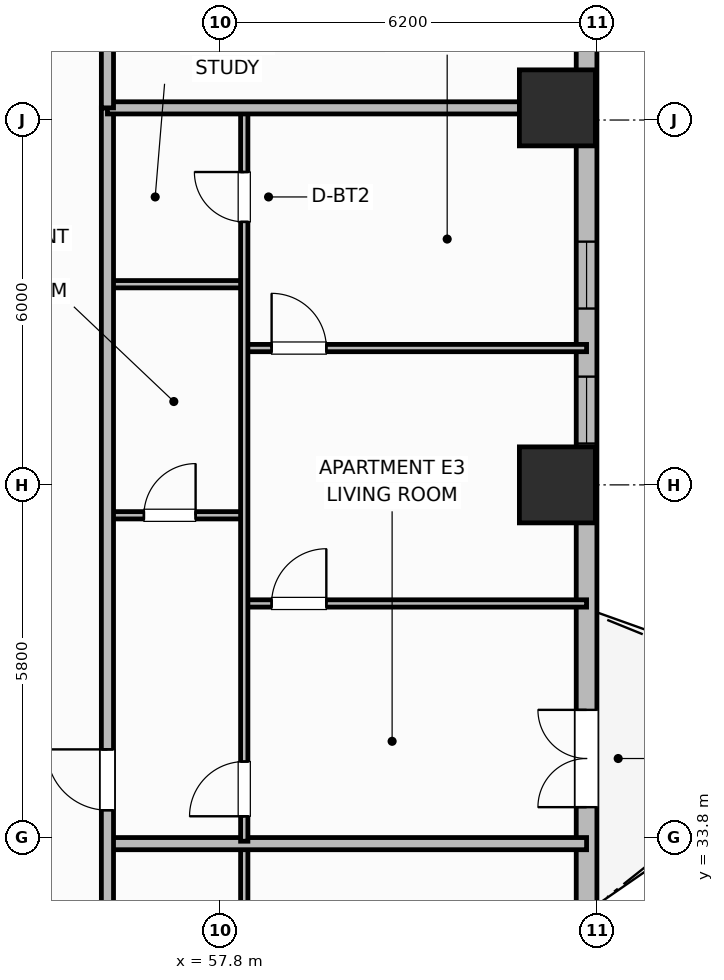
"""IFC4 building model, lengths in metres.
Left out: names, types, materials, properties, quantities, classifications, styles, units other than length and angle.
Written with IfcOpenShell. Run it as: python <this file> out.ifc"""

import sys

from ifc_helpers import new_model, si_unit, direction, frame, frame_2d, origin, origin_2d, place, context, subcontext, project, spatial, rectangle, extrude, element, fill, save


model = new_model("IFC4")
c1 = context("Model", 3, precision=1e-05, world=origin(), true_north=direction((0.0, 1.0)))
c2 = subcontext(c1, "Body", "Model", "MODEL_VIEW")
j1 = project(units=[si_unit("LENGTHUNIT", "METRE"), si_unit("PLANEANGLEUNIT", "RADIAN")], contexts=[c1])
p1 = place(None, origin())
s1 = spatial("IfcSite", under=j1, at=p1, CompositionType="ELEMENT")
p2 = place(p1, origin())
s2 = spatial("IfcBuilding", under=s1, at=p2, CompositionType="ELEMENT")
p3 = place(p2, frame((0.0, 0.0, 28.8)))
s3 = spatial("IfcBuildingStorey", under=s2, at=p3, CompositionType="ELEMENT", Elevation=28.8)
for number, where, z_axis, x_axis in (
    (1, (63.35, 39.6, 0.0), (0.0, 0.0, 1.0), (1.0, 0.0, 0.0)),
    (2, (63.35, 45.8, 0.0), (0.0, 0.0, 1.0), (1.0, 0.0, 0.0)),
):
    element("IfcColumn", number, at=place(p3, frame(where, z_axis=z_axis, x_axis=x_axis)), inside=s3, PredefinedType="COLUMN", context=c2, shape_type="SweptSolid", body=[
        extrude(rectangle(XDim=1.25, YDim=1.25, at=origin_2d()), origin(), (0.0, 0.0, 1.0), 3.7),
    ])
p4 = place(p3, frame((63.83, 32.6, 0.0), z_axis=(0.0, 0.0, 1.0), x_axis=(0.0, 1.0, 0.0)))
e3 = element("IfcWall", 3, at=p4, inside=s3, PredefinedType="SOLIDWALL", context=c2, shape_type="SweptSolid", body=[
    extrude(rectangle(XDim=14.8, YDim=0.34, at=frame_2d((7.4, 0.0))), origin(), (0.0, 0.0, 1.0), 2.7),
])
p5 = place(p4, frame((1.7, 0.0, 0.0)))
e4 = element("IfcOpeningElement", 4, at=p5, cuts=e3, PredefinedType="OPENING", context=c2, shape_type="SweptSolid", body=[
    extrude(rectangle(XDim=1.6, YDim=2.1, at=frame_2d((0.8, 1.05))), frame((0.0, 0.18, 0.0), z_axis=(0.0, -1.0, 0.0), x_axis=(1.0, 0.0, 0.0)), (0.0, 0.0, 1.0), 0.36),
])
p6 = place(p4, frame((7.68, 0.0, 0.89)))
e5 = element("IfcOpeningElement", 5, at=p6, cuts=e3, PredefinedType="OPENING", context=c2, shape_type="SweptSolid", body=[
    extrude(rectangle(XDim=1.1, YDim=1.65, at=frame_2d((0.55, 0.825))), frame((0.0, 0.18, 0.0), z_axis=(0.0, -1.0, 0.0), x_axis=(1.0, 0.0, 0.0)), (0.0, 0.0, 1.0), 0.36),
])
p7 = place(p4, frame((9.9, 0.0, 0.93)))
e6 = element("IfcOpeningElement", 6, at=p7, cuts=e3, PredefinedType="OPENING", context=c2, shape_type="SweptSolid", body=[
    extrude(rectangle(XDim=1.1, YDim=1.65, at=frame_2d((0.55, 0.825))), frame((0.0, 0.18, 0.0), z_axis=(0.0, -1.0, 0.0), x_axis=(1.0, 0.0, 0.0)), (0.0, 0.0, 1.0), 0.36),
])
p8 = place(p3, frame((58.2, 22.608, 0.0), z_axis=(0.0, 0.0, 1.0), x_axis=(0.0, 1.0, 0.0)))
e7 = element("IfcWall", 7, at=p8, inside=s3, PredefinedType="PARTITIONING", context=c2, shape_type="SweptSolid", body=[
    extrude(rectangle(XDim=11.052, YDim=0.12, at=frame_2d((5.526, 0.0))), origin(), (0.0, 0.0, 1.0), 2.53),
])
p9 = place(p8, frame((0.41, 0.0, 0.0)))
e8 = element("IfcOpeningElement", 8, at=p9, cuts=e7, PredefinedType="OPENING", context=c2, shape_type="SweptSolid", body=[
    extrude(rectangle(XDim=0.9, YDim=2.1, at=frame_2d((0.45, 1.05))), frame((0.0, 0.07, 0.0), z_axis=(0.0, -1.0, 0.0), x_axis=(1.0, 0.0, 0.0)), (0.0, 0.0, 1.0), 0.14),
])
p10 = place(p3, frame((55.95, 33.7, 0.0), z_axis=(0.0, 0.0, 1.0), x_axis=(1.0, 0.0, 0.0)))
e9 = element("IfcWall", 9, at=p10, inside=s3, PredefinedType="PARTITIONING", context=c2, shape_type="SweptSolid", body=[
    extrude(rectangle(XDim=7.88, YDim=0.2, at=frame_2d((3.94, 0.0))), origin(), (0.0, 0.0, 1.0), 2.53),
])
p11 = place(p3, frame((55.95, 39.1, 0.0), z_axis=(0.0, 0.0, 1.0), x_axis=(1.0, 0.0, 0.0)))
e10 = element("IfcWall", 10, at=p11, inside=s3, PredefinedType="PARTITIONING", context=c2, shape_type="SweptSolid", body=[
    extrude(rectangle(XDim=2.25, YDim=0.12, at=frame_2d((1.125, 0.0))), origin(), (0.0, 0.0, 1.0), 2.53),
])
p12 = place(p11, frame((0.6, 0.0, 0.0)))
e11 = element("IfcOpeningElement", 11, at=p12, cuts=e10, PredefinedType="OPENING", context=c2, shape_type="SweptSolid", body=[
    extrude(rectangle(XDim=0.85, YDim=2.1, at=frame_2d((0.425, 1.05))), frame((0.0, 0.07, 0.0), z_axis=(0.0, -1.0, 0.0), x_axis=(1.0, 0.0, 0.0)), (0.0, 0.0, 1.0), 0.14),
])
p13 = place(p3, frame((55.95, 42.9, 0.0), z_axis=(0.0, 0.0, 1.0), x_axis=(1.0, 0.0, 0.0)))
e12 = element("IfcWall", 12, at=p13, inside=s3, PredefinedType="PARTITIONING", context=c2, shape_type="SweptSolid", body=[
    extrude(rectangle(XDim=2.25, YDim=0.12, at=frame_2d((1.125, 0.0))), origin(), (0.0, 0.0, 1.0), 2.53),
])
p14 = place(p3, frame((58.2, 37.65, 0.0), z_axis=(0.0, 0.0, 1.0), x_axis=(1.0, 0.0, 0.0)))
e13 = element("IfcWall", 13, at=p14, inside=s3, PredefinedType="PARTITIONING", context=c2, shape_type="SweptSolid", body=[
    extrude(rectangle(XDim=5.63, YDim=0.12, at=frame_2d((2.815, 0.0))), origin(), (0.0, 0.0, 1.0), 2.53),
])
p15 = place(p14, frame((0.45, 0.0, 0.0)))
e14 = element("IfcOpeningElement", 14, at=p15, cuts=e13, PredefinedType="OPENING", context=c2, shape_type="SweptSolid", body=[
    extrude(rectangle(XDim=0.9, YDim=2.1, at=frame_2d((0.45, 1.05))), frame((0.0, 0.07, 0.0), z_axis=(0.0, -1.0, 0.0), x_axis=(1.0, 0.0, 0.0)), (0.0, 0.0, 1.0), 0.14),
])
p16 = place(p3, frame((58.2, 41.85, 0.0), z_axis=(0.0, 0.0, 1.0), x_axis=(1.0, 0.0, 0.0)))
e15 = element("IfcWall", 15, at=p16, inside=s3, PredefinedType="PARTITIONING", context=c2, shape_type="SweptSolid", body=[
    extrude(rectangle(XDim=5.63, YDim=0.12, at=frame_2d((2.815, 0.0))), origin(), (0.0, 0.0, 1.0), 2.53),
])
p17 = place(p16, frame((0.45, 0.0, 0.0)))
e16 = element("IfcOpeningElement", 16, at=p17, cuts=e15, PredefinedType="OPENING", context=c2, shape_type="SweptSolid", body=[
    extrude(rectangle(XDim=0.9, YDim=2.1, at=frame_2d((0.45, 1.05))), frame((0.0, 0.07, 0.0), z_axis=(0.0, -1.0, 0.0), x_axis=(1.0, 0.0, 0.0)), (0.0, 0.0, 1.0), 0.14),
])
p18 = place(p3, frame((58.2, 33.74, 0.0), z_axis=(0.0, 0.0, 1.0), x_axis=(0.0, 1.0, 0.0)))
e17 = element("IfcWall", 17, at=p18, inside=s3, PredefinedType="PARTITIONING", context=c2, shape_type="SweptSolid", body=[
    extrude(rectangle(XDim=12.02, YDim=0.12, at=frame_2d((6.01, 0.0))), origin(), (0.0, 0.0, 1.0), 2.53),
])
p19 = place(p18, frame((0.41, 0.0, 0.0)))
e18 = element("IfcOpeningElement", 18, at=p19, cuts=e17, PredefinedType="OPENING", context=c2, shape_type="SweptSolid", body=[
    extrude(rectangle(XDim=0.9, YDim=2.1, at=frame_2d((0.45, 1.05))), frame((0.0, 0.07, 0.0), z_axis=(0.0, -1.0, 0.0), x_axis=(1.0, 0.0, 0.0)), (0.0, 0.0, 1.0), 0.14),
])
p20 = place(p18, frame((10.185, 0.0, 0.0)))
e19 = element("IfcOpeningElement", 19, at=p20, cuts=e17, PredefinedType="OPENING", context=c2, shape_type="SweptSolid", body=[
    extrude(rectangle(XDim=0.82, YDim=2.08, at=frame_2d((0.41, 1.04))), frame((0.0, 0.07, 0.0), z_axis=(0.0, -1.0, 0.0), x_axis=(1.0, 0.0, 0.0)), (0.0, 0.0, 1.0), 0.14),
])
p21 = place(p3, frame((55.95, 10.6, 0.0), z_axis=(0.0, 0.0, 1.0), x_axis=(0.0, 1.0, 0.0)))
e20 = element("IfcWall", 20, at=p21, inside=s3, PredefinedType="PARTITIONING", context=c2, shape_type="SweptSolid", body=[
    extrude(rectangle(XDim=35.2, YDim=0.2, at=frame_2d((17.6, 0.0))), origin(), (0.0, 0.0, 1.0), 2.53),
])
p22 = place(p21, frame((2.65, 0.0, 0.0)))
e21 = element("IfcOpeningElement", 21, at=p22, cuts=e20, PredefinedType="OPENING", context=c2, shape_type="SweptSolid", body=[
    extrude(rectangle(XDim=1.0, YDim=2.15, at=frame_2d((0.5, 1.075))), frame((0.0, 0.11, 0.0), z_axis=(0.0, -1.0, 0.0), x_axis=(1.0, 0.0, 0.0)), (0.0, 0.0, 1.0), 0.22),
])
p23 = place(p21, frame((12.518, 0.0, 0.0)))
e22 = element("IfcOpeningElement", 22, at=p23, cuts=e20, PredefinedType="OPENING", context=c2, shape_type="SweptSolid", body=[
    extrude(rectangle(XDim=1.0, YDim=2.15, at=frame_2d((0.5, 1.075))), frame((0.0, 0.11, 0.0), z_axis=(0.0, -1.0, 0.0), x_axis=(1.0, 0.0, 0.0)), (0.0, 0.0, 1.0), 0.22),
])
p24 = place(p21, frame((23.65, 0.0, 0.0)))
e23 = element("IfcOpeningElement", 23, at=p24, cuts=e20, PredefinedType="OPENING", context=c2, shape_type="SweptSolid", body=[
    extrude(rectangle(XDim=1.0, YDim=2.15, at=frame_2d((0.5, 1.075))), frame((0.0, 0.11, 0.0), z_axis=(0.0, -1.0, 0.0), x_axis=(1.0, 0.0, 0.0)), (0.0, 0.0, 1.0), 0.22),
])
p25 = place(p3, frame((55.95, 45.8, 0.0), z_axis=(0.0, 0.0, 1.0), x_axis=(1.0, 0.0, 0.0)))
e24 = element("IfcWall", 24, at=p25, inside=s3, PredefinedType="PARTITIONING", context=c2, shape_type="SweptSolid", body=[
    extrude(rectangle(XDim=7.46, YDim=0.2, at=frame_2d((3.73, 0.0))), origin(), (0.0, 0.0, 1.0), 2.53),
])
p26 = place(p3, frame((55.95, 45.8, 0.0), z_axis=(0.0, 0.0, 1.0), x_axis=(0.0, 1.0, 0.0)))
e25 = element("IfcWall", 25, at=p26, inside=s3, PredefinedType="PARTITIONING", context=c2, shape_type="SweptSolid", body=[
    extrude(rectangle(XDim=5.63, YDim=0.2, at=frame_2d((2.815, 0.0))), origin(), (0.0, 0.0, 1.0), 2.53),
])
p27 = place(p5, origin())
e26 = element("IfcDoor", 26, at=p27, inside=s3, OperationType="DOUBLE_DOOR_SINGLE_SWING", PredefinedType="DOOR", context=c2, shape_type="SweptSolid", body=[
    extrude(rectangle(XDim=1.6, YDim=2.1, at=frame_2d((0.8, 1.05))), frame((0.0, 0.025, 0.0), z_axis=(0.0, -1.0, 0.0), x_axis=(1.0, 0.0, 0.0)), (0.0, 0.0, 1.0), 0.05),
])
fill(e4, e26)
p28 = place(p6, origin())
e27 = element("IfcWindow", 27, at=p28, inside=s3, PartitioningType="SINGLE_PANEL", PredefinedType="WINDOW", context=c2, shape_type="SweptSolid", body=[
    extrude(rectangle(XDim=1.1, YDim=1.65, at=frame_2d((0.55, 0.825))), frame((0.0, 0.03, 0.0), z_axis=(0.0, -1.0, 0.0), x_axis=(1.0, 0.0, 0.0)), (0.0, 0.0, 1.0), 0.06),
])
fill(e5, e27)
p29 = place(p7, origin())
e28 = element("IfcWindow", 28, at=p29, inside=s3, PartitioningType="SINGLE_PANEL", PredefinedType="WINDOW", context=c2, shape_type="SweptSolid", body=[
    extrude(rectangle(XDim=1.1, YDim=1.65, at=frame_2d((0.55, 0.825))), frame((0.0, 0.03, 0.0), z_axis=(0.0, -1.0, 0.0), x_axis=(1.0, 0.0, 0.0)), (0.0, 0.0, 1.0), 0.06),
])
fill(e6, e28)
p30 = place(p12, origin())
e29 = element("IfcDoor", 29, at=p30, inside=s3, OperationType="SINGLE_SWING_RIGHT", PredefinedType="DOOR", context=c2, shape_type="SweptSolid", body=[
    extrude(rectangle(XDim=0.85, YDim=2.1, at=frame_2d((0.425, 1.05))), frame((0.0, 0.025, 0.0), z_axis=(0.0, -1.0, 0.0), x_axis=(1.0, 0.0, 0.0)), (0.0, 0.0, 1.0), 0.05),
])
fill(e11, e29)
p31 = place(p15, origin())
e30 = element("IfcDoor", 30, at=p31, inside=s3, OperationType="SINGLE_SWING_RIGHT", PredefinedType="DOOR", context=c2, shape_type="SweptSolid", body=[
    extrude(rectangle(XDim=0.9, YDim=2.1, at=frame_2d((0.45, 1.05))), frame((0.0, 0.025, 0.0), z_axis=(0.0, -1.0, 0.0), x_axis=(1.0, 0.0, 0.0)), (0.0, 0.0, 1.0), 0.05),
])
fill(e14, e30)
p32 = place(p17, origin())
e31 = element("IfcDoor", 31, at=p32, inside=s3, OperationType="SINGLE_SWING_LEFT", PredefinedType="DOOR", context=c2, shape_type="SweptSolid", body=[
    extrude(rectangle(XDim=0.9, YDim=2.1, at=frame_2d((0.45, 1.05))), frame((0.0, 0.025, 0.0), z_axis=(0.0, -1.0, 0.0), x_axis=(1.0, 0.0, 0.0)), (0.0, 0.0, 1.0), 0.05),
])
fill(e16, e31)
p33 = place(p19, origin())
e32 = element("IfcDoor", 32, at=p33, inside=s3, OperationType="SINGLE_SWING_LEFT", PredefinedType="DOOR", context=c2, shape_type="SweptSolid", body=[
    extrude(rectangle(XDim=0.9, YDim=2.1, at=frame_2d((0.45, 1.05))), frame((0.0, 0.025, 0.0), z_axis=(0.0, -1.0, 0.0), x_axis=(1.0, 0.0, 0.0)), (0.0, 0.0, 1.0), 0.05),
])
fill(e18, e32)
p34 = place(p20, origin())
e33 = element("IfcDoor", 33, at=p34, inside=s3, OperationType="SINGLE_SWING_RIGHT", PredefinedType="DOOR", context=c2, shape_type="SweptSolid", body=[
    extrude(rectangle(XDim=0.82, YDim=2.08, at=frame_2d((0.41, 1.04))), frame((0.0, 0.025, 0.0), z_axis=(0.0, -1.0, 0.0), x_axis=(1.0, 0.0, 0.0)), (0.0, 0.0, 1.0), 0.05),
])
fill(e19, e33)
p35 = place(p24, origin())
e34 = element("IfcDoor", 34, at=p35, inside=s3, OperationType="SINGLE_SWING_RIGHT", PredefinedType="DOOR", context=c2, shape_type="SweptSolid", body=[
    extrude(rectangle(XDim=1.0, YDim=2.15, at=frame_2d((0.5, 1.075))), frame((0.0, 0.025, 0.0), z_axis=(0.0, -1.0, 0.0), x_axis=(1.0, 0.0, 0.0)), (0.0, 0.0, 1.0), 0.05),
])
fill(e23, e34)
save(model, sys.argv[1])
